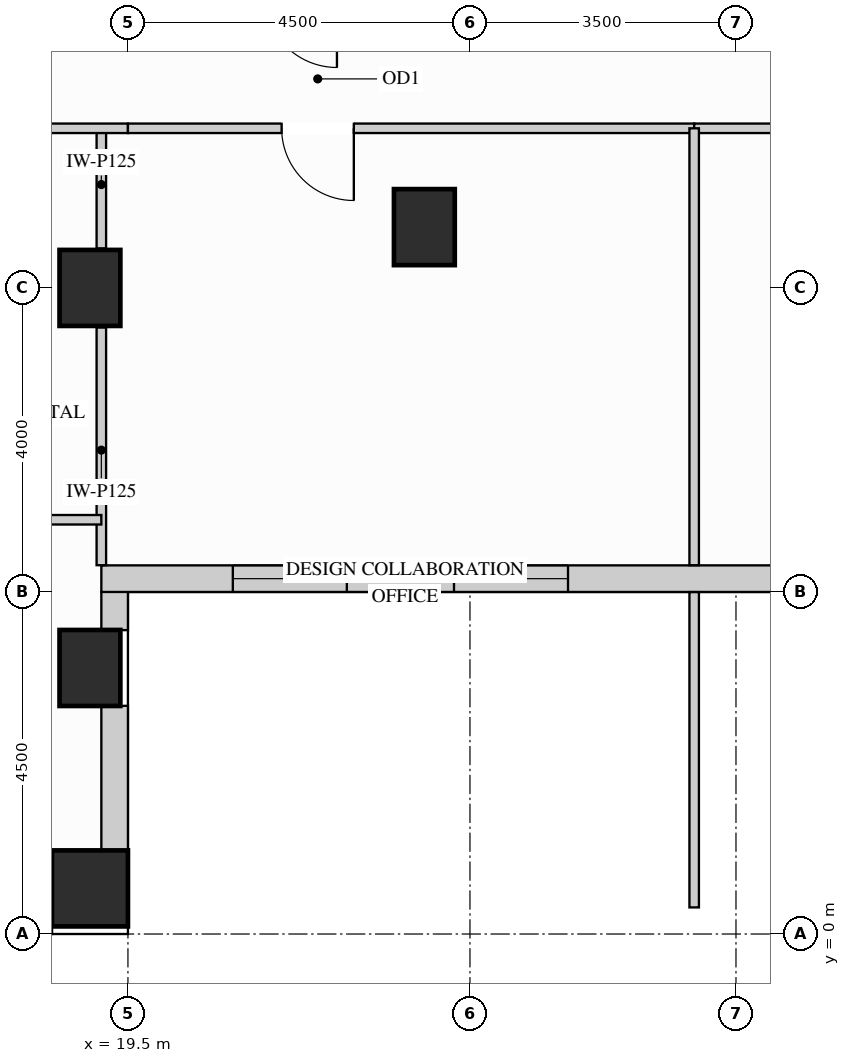
"""IFC4 building model, lengths in metres.
Left out: names, types, materials, properties, quantities, classifications, styles, units other than length and angle.
Written with IfcOpenShell. Run it as: python <this file> out.ifc"""

import sys

from ifc_helpers import new_model, si_unit, direction, frame, frame_2d, origin, origin_2d, place, context, subcontext, project, spatial, rectangle, extrude, source, transform, mapped, element, fill, save


model = new_model("IFC4")
c1 = context("Model", 3, precision=1e-05, world=origin(), true_north=direction((0.0, 1.0)))
c2 = subcontext(c1, "Body", "Model", "MODEL_VIEW")
j1 = project(units=[si_unit("LENGTHUNIT", "METRE"), si_unit("PLANEANGLEUNIT", "RADIAN")], contexts=[c1])
p1 = place(None, origin())
s1 = spatial("IfcSite", under=j1, at=p1, CompositionType="ELEMENT")
p2 = place(p1, origin())
s2 = spatial("IfcBuilding", under=s1, at=p2, CompositionType="ELEMENT")
p3 = place(p2, frame((0.0, 0.0, 146.7)))
s3 = spatial("IfcBuildingStorey", under=s2, at=p3, CompositionType="ELEMENT", Elevation=146.7)
m1 = source(origin(), c2, "Body", "SweptSolid", [
    extrude(rectangle(XDim=0.8, YDim=1.0, at=origin_2d()), origin(), (0.0, 0.0, 1.0), 3.4),
])
for number, where, z_axis, x_axis in (
    (1, (19.0, 3.5, 0.0), (0.0, 0.0, 1.0), (1.0, 0.0, 0.0)),
    (2, (19.0, 8.5, 0.0), (0.0, 0.0, 1.0), (1.0, 0.0, 0.0)),
    (3, (23.4, 9.3, 0.0), (0.0, 0.0, 1.0), (1.0, 0.0, 0.0)),
):
    element("IfcColumn", number, at=place(p3, frame(where, z_axis=z_axis, x_axis=x_axis)), inside=s3, PredefinedType="COLUMN", context=c2, shape_type="MappedRepresentation", body=[
        mapped(m1, transform((0.0, 0.0, 0.0), x_axis=(1.0, 0.0, 0.0), y_axis=(0.0, 1.0, 0.0), z_axis=(0.0, 0.0, 1.0))),
    ])
m2 = source(origin(), c2, "Body", "SweptSolid", [
    extrude(rectangle(XDim=1.0, YDim=1.0, at=origin_2d()), origin(), (0.0, 0.0, 1.0), 3.4),
])
p4 = place(p3, frame((19.0, 0.6, 0.0), z_axis=(0.0, 0.0, 1.0), x_axis=(1.0, 0.0, 0.0)))
e4 = element("IfcColumn", 4, at=p4, inside=s3, PredefinedType="COLUMN", context=c2, shape_type="MappedRepresentation", body=[
    mapped(m2, transform((0.0, 0.0, 0.0), x_axis=(1.0, 0.0, 0.0), y_axis=(0.0, 1.0, 0.0), z_axis=(0.0, 0.0, 1.0))),
])
p5 = place(p3, frame((14.998, 0.175, 0.0), z_axis=(0.0, 0.0, 1.0), x_axis=(1.0, 0.0, 0.0)))
e5 = element("IfcWall", 5, at=p5, inside=s3, PredefinedType="SOLIDWALL", context=c2, shape_type="SweptSolid", body=[
    extrude(rectangle(XDim=3.504, YDim=0.35, at=frame_2d((1.752, 0.0))), origin(), (0.0, 0.0, 1.0), 2.612),
])
p6 = place(p5, frame((0.552, 0.0, 0.78)))
e6 = element("IfcOpeningElement", 6, at=p6, cuts=e5, PredefinedType="OPENING", context=c2, shape_type="SweptSolid", body=[
    extrude(rectangle(XDim=2.4, YDim=1.652, at=frame_2d((1.2, 0.826))), frame((0.0, 0.185, 0.0), z_axis=(0.0, -1.0, 0.0), x_axis=(1.0, 0.0, 0.0)), (0.0, 0.0, 1.0), 0.37),
])
m3 = source(origin(), c2, "Body", "SweptSolid", [
    extrude(rectangle(XDim=1.904, YDim=0.35, at=frame_2d((0.952, 0.0))), origin(), (0.0, 0.0, 1.0), 2.612),
])
p7 = place(p3, frame((19.325, 1.098, 0.0), z_axis=(0.0, 0.0, 1.0), x_axis=(0.0, 1.0, 0.0)))
e7 = element("IfcWall", 7, at=p7, inside=s3, PredefinedType="SOLIDWALL", context=c2, shape_type="MappedRepresentation", body=[
    mapped(m3, transform((0.0, 0.0, 0.0), x_axis=(1.0, 0.0, 0.0), y_axis=(0.0, 1.0, 0.0), z_axis=(0.0, 0.0, 1.0))),
])
m4 = source(origin(), c2, "Body", "SweptSolid", [
    extrude(rectangle(XDim=0.504, YDim=0.35, at=frame_2d((0.252, 0.0))), origin(), (0.0, 0.0, 1.0), 2.773),
])
p8 = place(p3, frame((19.325, 3.998, 0.0), z_axis=(0.0, 0.0, 1.0), x_axis=(0.0, 1.0, 0.0)))
e8 = element("IfcWall", 8, at=p8, inside=s3, PredefinedType="SOLIDWALL", context=c2, shape_type="MappedRepresentation", body=[
    mapped(m4, transform((0.0, 0.0, 0.0), x_axis=(1.0, 0.0, 0.0), y_axis=(0.0, 1.0, 0.0), z_axis=(0.0, 0.0, 1.0))),
])
p9 = place(p3, frame((19.15, 4.675, 0.0), z_axis=(0.0, 0.0, 1.0), x_axis=(1.0, 0.0, 0.0)))
e9 = element("IfcWall", 9, at=p9, inside=s3, PredefinedType="SOLIDWALL", context=c2, shape_type="SweptSolid", body=[
    extrude(rectangle(XDim=14.98, YDim=0.35, at=frame_2d((7.49, 0.0))), origin(), (0.0, 0.0, 1.0), 3.385),
])
p10 = place(p9, frame((1.73, 0.0, 0.78)))
e10 = element("IfcOpeningElement", 10, at=p10, cuts=e9, PredefinedType="OPENING", context=c2, shape_type="SweptSolid", body=[
    extrude(rectangle(XDim=1.5, YDim=2.0, at=frame_2d((0.75, 1.0))), frame((0.0, 0.185, 0.0), z_axis=(0.0, -1.0, 0.0), x_axis=(1.0, 0.0, 0.0)), (0.0, 0.0, 1.0), 0.37),
])
p11 = place(p9, frame((4.64, 0.0, 0.78)))
e11 = element("IfcOpeningElement", 11, at=p11, cuts=e9, PredefinedType="OPENING", context=c2, shape_type="SweptSolid", body=[
    extrude(rectangle(XDim=1.5, YDim=2.0, at=frame_2d((0.75, 1.0))), frame((0.0, 0.185, 0.0), z_axis=(0.0, -1.0, 0.0), x_axis=(1.0, 0.0, 0.0)), (0.0, 0.0, 1.0), 0.37),
])
p12 = place(p9, frame((9.253, 0.0, 0.78)))
e12 = element("IfcOpeningElement", 12, at=p12, cuts=e9, PredefinedType="OPENING", context=c2, shape_type="SweptSolid", body=[
    extrude(rectangle(XDim=1.5, YDim=2.0, at=frame_2d((0.75, 1.0))), frame((0.0, 0.185, 0.0), z_axis=(0.0, -1.0, 0.0), x_axis=(1.0, 0.0, 0.0)), (0.0, 0.0, 1.0), 0.37),
])
p13 = place(p9, frame((11.957, 0.0, 0.78)))
e13 = element("IfcOpeningElement", 13, at=p13, cuts=e9, PredefinedType="OPENING", context=c2, shape_type="SweptSolid", body=[
    extrude(rectangle(XDim=1.5, YDim=2.0, at=frame_2d((0.75, 1.0))), frame((0.0, 0.185, 0.0), z_axis=(0.0, -1.0, 0.0), x_axis=(1.0, 0.0, 0.0)), (0.0, 0.0, 1.0), 0.37),
])
m5 = source(origin(), c2, "Body", "SweptSolid", [
    extrude(rectangle(XDim=3.128, YDim=0.125, at=frame_2d((1.564, 0.0))), origin(), (0.0, 0.0, 1.0), 2.773),
])
p14 = place(p3, frame((19.15, 4.852, 0.0), z_axis=(0.0, 0.0, 1.0), x_axis=(0.0, 1.0, 0.0)))
e14 = element("IfcWall", 14, at=p14, inside=s3, PredefinedType="PARTITIONING", context=c2, shape_type="MappedRepresentation", body=[
    mapped(m5, transform((0.0, 0.0, 0.0), x_axis=(1.0, 0.0, 0.0), y_axis=(0.0, 1.0, 0.0), z_axis=(0.0, 0.0, 1.0))),
])
m6 = source(origin(), c2, "Body", "SweptSolid", [
    extrude(rectangle(XDim=1.58, YDim=0.125, at=frame_2d((0.79, 0.0))), origin(), (0.0, 0.0, 1.0), 2.773),
])
p15 = place(p3, frame((19.15, 9.02, 0.0), z_axis=(0.0, 0.0, 1.0), x_axis=(0.0, 1.0, 0.0)))
e15 = element("IfcWall", 15, at=p15, inside=s3, PredefinedType="PARTITIONING", context=c2, shape_type="MappedRepresentation", body=[
    mapped(m6, transform((0.0, 0.0, 0.0), x_axis=(1.0, 0.0, 0.0), y_axis=(0.0, 1.0, 0.0), z_axis=(0.0, 0.0, 1.0))),
])
m7 = source(origin(), c2, "Body", "SweptSolid", [
    extrude(rectangle(XDim=2.95, YDim=0.125, at=frame_2d((1.475, 0.0))), origin(), (0.0, 0.0, 1.0), 3.385),
])
p16 = place(p3, frame((16.55, 10.6, 0.0), z_axis=(0.0, 0.0, 1.0), x_axis=(1.0, 0.0, 0.0)))
e16 = element("IfcWall", 16, at=p16, inside=s3, PredefinedType="PARTITIONING", context=c2, shape_type="MappedRepresentation", body=[
    mapped(m7, transform((0.0, 0.0, 0.0), x_axis=(1.0, 0.0, 0.0), y_axis=(0.0, 1.0, 0.0), z_axis=(0.0, 0.0, 1.0))),
])
p17 = place(p3, frame((19.5, 10.6, 0.0), z_axis=(0.0, 0.0, 1.0), x_axis=(1.0, 0.0, 0.0)))
e17 = element("IfcWall", 17, at=p17, inside=s3, PredefinedType="PARTITIONING", context=c2, shape_type="SweptSolid", body=[
    extrude(rectangle(XDim=7.45, YDim=0.125, at=frame_2d((3.725, 0.0))), origin(), (0.0, 0.0, 1.0), 3.385),
])
p18 = place(p17, frame((2.022, 0.0, 0.0)))
e18 = element("IfcOpeningElement", 18, at=p18, cuts=e17, PredefinedType="OPENING", context=c2, shape_type="SweptSolid", body=[
    extrude(rectangle(XDim=0.95, YDim=2.15, at=frame_2d((0.475, 1.075))), frame((0.0, 0.073, 0.0), z_axis=(0.0, -1.0, 0.0), x_axis=(1.0, 0.0, 0.0)), (0.0, 0.0, 1.0), 0.145),
])
p19 = place(p3, frame((26.95, 10.6, 0.0), z_axis=(0.0, 0.0, 1.0), x_axis=(1.0, 0.0, 0.0)))
e19 = element("IfcWall", 19, at=p19, inside=s3, PredefinedType="PARTITIONING", context=c2, shape_type="SweptSolid", body=[
    extrude(rectangle(XDim=7.45, YDim=0.125, at=frame_2d((3.725, 0.0))), origin(), (0.0, 0.0, 1.0), 3.385),
])
p20 = place(p19, frame((4.478, 0.0, 0.0)))
e20 = element("IfcOpeningElement", 20, at=p20, cuts=e19, PredefinedType="OPENING", context=c2, shape_type="SweptSolid", body=[
    extrude(rectangle(XDim=0.95, YDim=2.15, at=frame_2d((0.475, 1.075))), frame((0.0, 0.073, 0.0), z_axis=(0.0, -1.0, 0.0), x_axis=(1.0, 0.0, 0.0)), (0.0, 0.0, 1.0), 0.145),
])
m8 = source(origin(), c2, "Body", "SweptSolid", [
    extrude(rectangle(XDim=4.148, YDim=0.125, at=frame_2d((2.074, 0.0))), origin(), (0.0, 0.0, 1.0), 3.385),
])
p21 = place(p3, frame((26.95, 0.35, 0.0), z_axis=(0.0, 0.0, 1.0), x_axis=(0.0, 1.0, 0.0)))
e21 = element("IfcWall", 21, at=p21, inside=s3, PredefinedType="PARTITIONING", context=c2, shape_type="MappedRepresentation", body=[
    mapped(m8, transform((0.0, 0.0, 0.0), x_axis=(1.0, 0.0, 0.0), y_axis=(0.0, 1.0, 0.0), z_axis=(0.0, 0.0, 1.0))),
])
m9 = source(origin(), c2, "Body", "SweptSolid", [
    extrude(rectangle(XDim=5.748, YDim=0.125, at=frame_2d((2.874, 0.0))), origin(), (0.0, 0.0, 1.0), 3.385),
])
p22 = place(p3, frame((26.95, 4.852, 0.0), z_axis=(0.0, 0.0, 1.0), x_axis=(0.0, 1.0, 0.0)))
e22 = element("IfcWall", 22, at=p22, inside=s3, PredefinedType="PARTITIONING", context=c2, shape_type="MappedRepresentation", body=[
    mapped(m9, transform((0.0, 0.0, 0.0), x_axis=(1.0, 0.0, 0.0), y_axis=(0.0, 1.0, 0.0), z_axis=(0.0, 0.0, 1.0))),
])
m10 = source(origin(), c2, "Body", "SweptSolid", [
    extrude(rectangle(XDim=2.6, YDim=0.125, at=frame_2d((1.3, 0.0))), origin(), (0.0, 0.0, 1.0), 3.385),
])
p23 = place(p3, frame((16.55, 5.45, 0.0), z_axis=(0.0, 0.0, 1.0), x_axis=(1.0, 0.0, 0.0)))
e23 = element("IfcWall", 23, at=p23, inside=s3, PredefinedType="PARTITIONING", context=c2, shape_type="MappedRepresentation", body=[
    mapped(m10, transform((0.0, 0.0, 0.0), x_axis=(1.0, 0.0, 0.0), y_axis=(0.0, 1.0, 0.0), z_axis=(0.0, 0.0, 1.0))),
])
m11 = source(origin(), c2, "Body", "SweptSolid", [
    extrude(rectangle(XDim=0.95, YDim=2.15, at=frame_2d((0.475, 1.075))), frame((0.0, 0.025, 0.0), z_axis=(0.0, -1.0, 0.0), x_axis=(1.0, 0.0, 0.0)), (0.0, 0.0, 1.0), 0.05),
])
p24 = place(p18, origin())
e24 = element("IfcDoor", 24, at=p24, inside=s3, OperationType="SINGLE_SWING_RIGHT", PredefinedType="DOOR", context=c2, shape_type="MappedRepresentation", body=[
    mapped(m11, transform((0.0, 0.0, 0.0), x_axis=(1.0, 0.0, 0.0), y_axis=(0.0, 1.0, 0.0), z_axis=(0.0, 0.0, 1.0))),
])
fill(e18, e24)
m12 = source(origin(), c2, "Body", "SweptSolid", [
    extrude(rectangle(XDim=1.5, YDim=2.0, at=frame_2d((0.75, 1.0))), frame((0.0, 0.03, 0.0), z_axis=(0.0, -1.0, 0.0), x_axis=(1.0, 0.0, 0.0)), (0.0, 0.0, 1.0), 0.06),
])
p25 = place(p10, origin())
e25 = element("IfcWindow", 25, at=p25, inside=s3, PartitioningType="SINGLE_PANEL", PredefinedType="WINDOW", context=c2, shape_type="MappedRepresentation", body=[
    mapped(m12, transform((0.0, 0.0, 0.0), x_axis=(1.0, 0.0, 0.0), y_axis=(0.0, 1.0, 0.0), z_axis=(0.0, 0.0, 1.0))),
])
fill(e10, e25)
p26 = place(p11, origin())
e26 = element("IfcWindow", 26, at=p26, inside=s3, PartitioningType="SINGLE_PANEL", PredefinedType="WINDOW", context=c2, shape_type="MappedRepresentation", body=[
    mapped(m12, transform((0.0, 0.0, 0.0), x_axis=(1.0, 0.0, 0.0), y_axis=(0.0, 1.0, 0.0), z_axis=(0.0, 0.0, 1.0))),
])
fill(e11, e26)
save(model, sys.argv[1])
